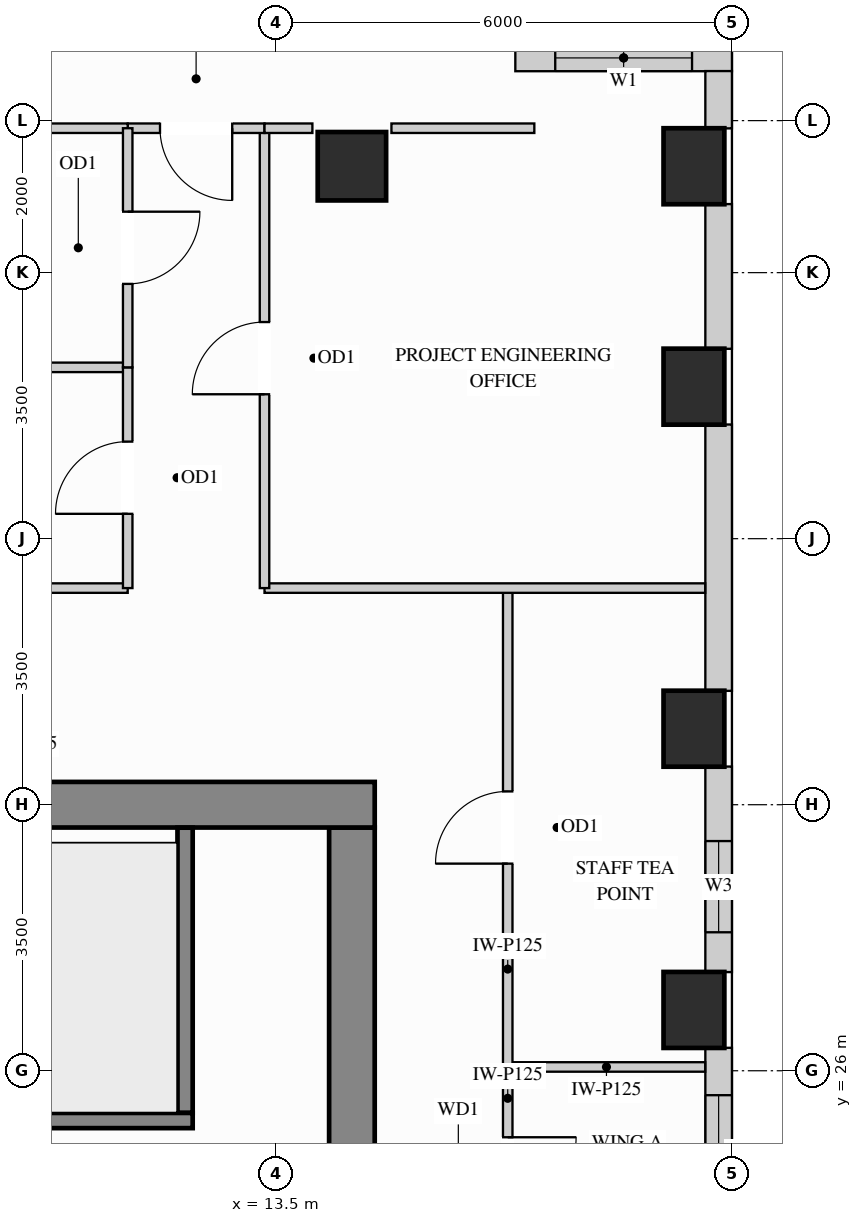
"""IFC4 building model, lengths in metres.
Left out: names, types, materials, properties, quantities, classifications, styles, units other than length and angle.
Written with IfcOpenShell. Run it as: python <this file> out.ifc"""

import sys

from ifc_helpers import new_model, si_unit, direction, frame, frame_2d, origin, origin_2d, place, context, subcontext, project, spatial, rectangle, extrude, source, transform, mapped, element, fill, save


model = new_model("IFC4")
c1 = context("Model", 3, precision=1e-05, world=origin(), true_north=direction((0.0, 1.0)))
c2 = subcontext(c1, "Body", "Model", "MODEL_VIEW")
j1 = project(units=[si_unit("LENGTHUNIT", "METRE"), si_unit("PLANEANGLEUNIT", "RADIAN")], contexts=[c1])
p1 = place(None, origin())
s1 = spatial("IfcSite", under=j1, at=p1, CompositionType="ELEMENT")
p2 = place(p1, origin())
s2 = spatial("IfcBuilding", under=s1, at=p2, CompositionType="ELEMENT")
p3 = place(p2, frame((0.0, 0.0, 146.7)))
s3 = spatial("IfcBuildingStorey", under=s2, at=p3, CompositionType="ELEMENT", Elevation=146.7)
m1 = source(origin(), c2, "Body", "SweptSolid", [
    extrude(rectangle(XDim=0.9, YDim=0.9, at=origin_2d()), origin(), (0.0, 0.0, 1.0), 3.4),
])
p4 = place(p3, frame((14.5, 37.9, 0.0), z_axis=(0.0, 0.0, 1.0), x_axis=(1.0, 0.0, 0.0)))
e1 = element("IfcColumn", 1, at=p4, inside=s3, PredefinedType="COLUMN", context=c2, shape_type="MappedRepresentation", body=[
    mapped(m1, transform((0.0, 0.0, 0.0), x_axis=(1.0, 0.0, 0.0), y_axis=(0.0, 1.0, 0.0), z_axis=(0.0, 0.0, 1.0))),
])
m2 = source(origin(), c2, "Body", "SweptSolid", [
    extrude(rectangle(XDim=0.8, YDim=1.0, at=origin_2d()), origin(), (0.0, 0.0, 1.0), 3.4),
])
for number, where, z_axis, x_axis in (
    (2, (19.0, 26.8, 0.0), (0.0, 0.0, 1.0), (1.0, 0.0, 0.0)),
    (3, (19.0, 30.5, 0.0), (0.0, 0.0, 1.0), (1.0, 0.0, 0.0)),
    (4, (19.0, 35.0, 0.0), (0.0, 0.0, 1.0), (1.0, 0.0, 0.0)),
    (5, (19.0, 37.9, 0.0), (0.0, 0.0, 1.0), (1.0, 0.0, 0.0)),
):
    element("IfcColumn", number, at=place(p3, frame(where, z_axis=z_axis, x_axis=x_axis)), inside=s3, PredefinedType="COLUMN", context=c2, shape_type="MappedRepresentation", body=[
        mapped(m2, transform((0.0, 0.0, 0.0), x_axis=(1.0, 0.0, 0.0), y_axis=(0.0, 1.0, 0.0), z_axis=(0.0, 0.0, 1.0))),
    ])
m3 = source(origin(), c2, "Body", "SweptSolid", [
    extrude(rectangle(XDim=8.32, YDim=0.6, at=frame_2d((4.16, 0.0))), origin(), (0.0, 0.0, 1.0), 3.4),
])
p5 = place(p3, frame((14.5, 20.88, 0.0), z_axis=(0.0, 0.0, 1.0), x_axis=(0.0, 1.0, 0.0)))
e6 = element("IfcWall", 6, at=p5, inside=s3, PredefinedType="SHEAR", context=c2, shape_type="MappedRepresentation", body=[
    mapped(m3, transform((0.0, 0.0, 0.0), x_axis=(1.0, 0.0, 0.0), y_axis=(0.0, 1.0, 0.0), z_axis=(0.0, 0.0, 1.0))),
])
m4 = source(origin(), c2, "Body", "SweptSolid", [
    extrude(rectangle(XDim=10.6, YDim=0.6, at=frame_2d((5.3, 0.0))), origin(), (0.0, 0.0, 1.0), 3.4),
])
p6 = place(p3, frame((4.2, 29.5, 0.0), z_axis=(0.0, 0.0, 1.0), x_axis=(1.0, 0.0, 0.0)))
e7 = element("IfcWall", 7, at=p6, inside=s3, PredefinedType="SHEAR", context=c2, shape_type="MappedRepresentation", body=[
    mapped(m4, transform((0.0, 0.0, 0.0), x_axis=(1.0, 0.0, 0.0), y_axis=(0.0, 1.0, 0.0), z_axis=(0.0, 0.0, 1.0))),
])
p7 = place(p3, frame((19.5, 39.325, 0.0), z_axis=(0.0, 0.0, 1.0), x_axis=(-1.0, 0.0, 0.0)))
e8 = element("IfcWall", 8, at=p7, inside=s3, PredefinedType="SOLIDWALL", context=c2, shape_type="SweptSolid", body=[
    extrude(rectangle(XDim=2.85, YDim=0.35, at=frame_2d((1.425, 0.0))), origin(), (0.0, 0.0, 1.0), 3.385),
])
p8 = place(p7, frame((0.525, 0.0, 0.78)))
e9 = element("IfcOpeningElement", 9, at=p8, cuts=e8, PredefinedType="OPENING", context=c2, shape_type="SweptSolid", body=[
    extrude(rectangle(XDim=1.8, YDim=2.1, at=frame_2d((0.9, 1.05))), frame((0.0, 0.185, 0.0), z_axis=(0.0, -1.0, 0.0), x_axis=(1.0, 0.0, 0.0)), (0.0, 0.0, 1.0), 0.37),
])
p9 = place(p3, frame((19.325, 22.998, 0.0), z_axis=(0.0, 0.0, 1.0), x_axis=(0.0, 1.0, 0.0)))
e10 = element("IfcWall", 10, at=p9, inside=s3, PredefinedType="SOLIDWALL", context=c2, shape_type="SweptSolid", body=[
    extrude(rectangle(XDim=3.304, YDim=0.35, at=frame_2d((1.652, 0.0))), origin(), (0.0, 0.0, 1.0), 2.612),
])
p10 = place(p9, frame((1.18, 0.0, 0.78)))
e11 = element("IfcOpeningElement", 11, at=p10, cuts=e10, PredefinedType="OPENING", context=c2, shape_type="SweptSolid", body=[
    extrude(rectangle(XDim=1.5, YDim=1.652, at=frame_2d((0.75, 0.826))), frame((0.0, 0.185, 0.0), z_axis=(0.0, -1.0, 0.0), x_axis=(1.0, 0.0, 0.0)), (0.0, 0.0, 1.0), 0.37),
])
p11 = place(p3, frame((19.325, 27.298, 0.0), z_axis=(0.0, 0.0, 1.0), x_axis=(0.0, 1.0, 0.0)))
e12 = element("IfcWall", 12, at=p11, inside=s3, PredefinedType="SOLIDWALL", context=c2, shape_type="SweptSolid", body=[
    extrude(rectangle(XDim=2.704, YDim=0.35, at=frame_2d((1.352, 0.0))), origin(), (0.0, 0.0, 1.0), 2.612),
])
p12 = place(p11, frame((0.524, 0.0, 0.78)))
e13 = element("IfcOpeningElement", 13, at=p12, cuts=e12, PredefinedType="OPENING", context=c2, shape_type="SweptSolid", body=[
    extrude(rectangle(XDim=1.2, YDim=1.652, at=frame_2d((0.6, 0.826))), frame((0.0, 0.185, 0.0), z_axis=(0.0, -1.0, 0.0), x_axis=(1.0, 0.0, 0.0)), (0.0, 0.0, 1.0), 0.37),
])
m5 = source(origin(), c2, "Body", "SweptSolid", [
    extrude(rectangle(XDim=3.504, YDim=0.35, at=frame_2d((1.752, 0.0))), origin(), (0.0, 0.0, 1.0), 2.612),
])
p13 = place(p3, frame((19.325, 30.998, 0.0), z_axis=(0.0, 0.0, 1.0), x_axis=(0.0, 1.0, 0.0)))
e14 = element("IfcWall", 14, at=p13, inside=s3, PredefinedType="SOLIDWALL", context=c2, shape_type="MappedRepresentation", body=[
    mapped(m5, transform((0.0, 0.0, 0.0), x_axis=(1.0, 0.0, 0.0), y_axis=(0.0, 1.0, 0.0), z_axis=(0.0, 0.0, 1.0))),
])
m6 = source(origin(), c2, "Body", "SweptSolid", [
    extrude(rectangle(XDim=1.904, YDim=0.35, at=frame_2d((0.952, 0.0))), origin(), (0.0, 0.0, 1.0), 2.612),
])
p14 = place(p3, frame((19.325, 35.498, 0.0), z_axis=(0.0, 0.0, 1.0), x_axis=(0.0, 1.0, 0.0)))
e15 = element("IfcWall", 15, at=p14, inside=s3, PredefinedType="SOLIDWALL", context=c2, shape_type="MappedRepresentation", body=[
    mapped(m6, transform((0.0, 0.0, 0.0), x_axis=(1.0, 0.0, 0.0), y_axis=(0.0, 1.0, 0.0), z_axis=(0.0, 0.0, 1.0))),
])
m7 = source(origin(), c2, "Body", "SweptSolid", [
    extrude(rectangle(XDim=0.754, YDim=0.35, at=frame_2d((0.377, 0.0))), origin(), (0.0, 0.0, 1.0), 3.385),
])
p15 = place(p3, frame((19.325, 38.398, 0.0), z_axis=(0.0, 0.0, 1.0), x_axis=(0.0, 1.0, 0.0)))
e16 = element("IfcWall", 16, at=p15, inside=s3, PredefinedType="SOLIDWALL", context=c2, shape_type="MappedRepresentation", body=[
    mapped(m7, transform((0.0, 0.0, 0.0), x_axis=(1.0, 0.0, 0.0), y_axis=(0.0, 1.0, 0.0), z_axis=(0.0, 0.0, 1.0))),
])
m8 = source(origin(), c2, "Body", "SweptSolid", [
    extrude(rectangle(XDim=2.598, YDim=0.125, at=frame_2d((1.299, 0.0))), origin(), (0.0, 0.0, 1.0), 3.385),
])
p16 = place(p3, frame((16.55, 26.05, 0.0), z_axis=(0.0, 0.0, 1.0), x_axis=(1.0, 0.0, 0.0)))
e17 = element("IfcWall", 17, at=p16, inside=s3, PredefinedType="PARTITIONING", context=c2, shape_type="MappedRepresentation", body=[
    mapped(m8, transform((0.0, 0.0, 0.0), x_axis=(1.0, 0.0, 0.0), y_axis=(0.0, 1.0, 0.0), z_axis=(0.0, 0.0, 1.0))),
])
p17 = place(p3, frame((16.55, 26.05, 0.0), z_axis=(0.0, 0.0, 1.0), x_axis=(0.0, 1.0, 0.0)))
e18 = element("IfcWall", 18, at=p17, inside=s3, PredefinedType="PARTITIONING", context=c2, shape_type="SweptSolid", body=[
    extrude(rectangle(XDim=6.3, YDim=0.125, at=frame_2d((3.15, 0.0))), origin(), (0.0, 0.0, 1.0), 3.385),
])
p18 = place(p17, frame((2.675, 0.0, 0.0)))
e19 = element("IfcOpeningElement", 19, at=p18, cuts=e18, PredefinedType="OPENING", context=c2, shape_type="SweptSolid", body=[
    extrude(rectangle(XDim=0.95, YDim=2.15, at=frame_2d((0.475, 1.075))), frame((0.0, 0.073, 0.0), z_axis=(0.0, -1.0, 0.0), x_axis=(1.0, 0.0, 0.0)), (0.0, 0.0, 1.0), 0.145),
])
p19 = place(p3, frame((16.55, 23.35, 0.0), z_axis=(0.0, 0.0, 1.0), x_axis=(0.0, 1.0, 0.0)))
e20 = element("IfcWall", 20, at=p19, inside=s3, PredefinedType="PARTITIONING", context=c2, shape_type="SweptSolid", body=[
    extrude(rectangle(XDim=2.7, YDim=0.125, at=frame_2d((1.35, 0.0))), origin(), (0.0, 0.0, 1.0), 3.385),
])
p20 = place(p19, frame((0.875, 0.0, 0.0)))
e21 = element("IfcOpeningElement", 21, at=p20, cuts=e20, PredefinedType="OPENING", context=c2, shape_type="SweptSolid", body=[
    extrude(rectangle(XDim=0.9, YDim=2.15, at=frame_2d((0.45, 1.075))), frame((0.0, 0.073, 0.0), z_axis=(0.0, -1.0, 0.0), x_axis=(1.0, 0.0, 0.0)), (0.0, 0.0, 1.0), 0.145),
])
m9 = source(origin(), c2, "Body", "SweptSolid", [
    extrude(rectangle(XDim=5.798, YDim=0.125, at=frame_2d((2.899, 0.0))), origin(), (0.0, 0.0, 1.0), 3.385),
])
p21 = place(p3, frame((13.35, 32.35, 0.0), z_axis=(0.0, 0.0, 1.0), x_axis=(1.0, 0.0, 0.0)))
e22 = element("IfcWall", 22, at=p21, inside=s3, PredefinedType="PARTITIONING", context=c2, shape_type="MappedRepresentation", body=[
    mapped(m9, transform((0.0, 0.0, 0.0), x_axis=(1.0, 0.0, 0.0), y_axis=(0.0, 1.0, 0.0), z_axis=(0.0, 0.0, 1.0))),
])
m10 = source(origin(), c2, "Body", "SweptSolid", [
    extrude(rectangle(XDim=11.198, YDim=0.125, at=frame_2d((5.599, 0.0))), origin(), (0.0, 0.0, 1.0), 3.385),
])
p22 = place(p3, frame((0.352, 32.35, 0.0), z_axis=(0.0, 0.0, 1.0), x_axis=(1.0, 0.0, 0.0)))
e23 = element("IfcWall", 23, at=p22, inside=s3, PredefinedType="PARTITIONING", context=c2, shape_type="MappedRepresentation", body=[
    mapped(m10, transform((0.0, 0.0, 0.0), x_axis=(1.0, 0.0, 0.0), y_axis=(0.0, 1.0, 0.0), z_axis=(0.0, 0.0, 1.0))),
])
m11 = source(origin(), c2, "Body", "SweptSolid", [
    extrude(rectangle(XDim=10.43, YDim=0.125, at=frame_2d((5.215, 0.0))), origin(), (0.0, 0.0, 1.0), 3.385),
])
p23 = place(p3, frame((1.12, 35.254, 0.0), z_axis=(0.0, 0.0, 1.0), x_axis=(1.0, 0.0, 0.0)))
e24 = element("IfcWall", 24, at=p23, inside=s3, PredefinedType="PARTITIONING", context=c2, shape_type="MappedRepresentation", body=[
    mapped(m11, transform((0.0, 0.0, 0.0), x_axis=(1.0, 0.0, 0.0), y_axis=(0.0, 1.0, 0.0), z_axis=(0.0, 0.0, 1.0))),
])
p24 = place(p3, frame((13.35, 32.35, 0.0), z_axis=(0.0, 0.0, 1.0), x_axis=(0.0, 1.0, 0.0)))
e25 = element("IfcWall", 25, at=p24, inside=s3, PredefinedType="PARTITIONING", context=c2, shape_type="SweptSolid", body=[
    extrude(rectangle(XDim=6.05, YDim=0.125, at=frame_2d((3.025, 0.0))), origin(), (0.0, 0.0, 1.0), 3.385),
])
p25 = place(p24, frame((2.55, 0.0, 0.0)))
e26 = element("IfcOpeningElement", 26, at=p25, cuts=e25, PredefinedType="OPENING", context=c2, shape_type="SweptSolid", body=[
    extrude(rectangle(XDim=0.95, YDim=2.15, at=frame_2d((0.475, 1.075))), frame((0.0, 0.073, 0.0), z_axis=(0.0, -1.0, 0.0), x_axis=(1.0, 0.0, 0.0)), (0.0, 0.0, 1.0), 0.145),
])
p26 = place(p3, frame((11.55, 38.4, 0.0), z_axis=(0.0, 0.0, 1.0), x_axis=(1.0, 0.0, 0.0)))
e27 = element("IfcWall", 27, at=p26, inside=s3, PredefinedType="PARTITIONING", context=c2, shape_type="SweptSolid", body=[
    extrude(rectangle(XDim=1.8, YDim=0.125, at=frame_2d((0.9, 0.0))), origin(), (0.0, 0.0, 1.0), 3.385),
])
p27 = place(p26, frame((0.425, 0.0, 0.0)))
e28 = element("IfcOpeningElement", 28, at=p27, cuts=e27, PredefinedType="OPENING", context=c2, shape_type="SweptSolid", body=[
    extrude(rectangle(XDim=0.95, YDim=2.15, at=frame_2d((0.475, 1.075))), frame((0.0, 0.073, 0.0), z_axis=(0.0, -1.0, 0.0), x_axis=(1.0, 0.0, 0.0)), (0.0, 0.0, 1.0), 0.145),
])
m12 = source(origin(), c2, "Body", "SweptSolid", [
    extrude(rectangle(XDim=0.63, YDim=0.125, at=frame_2d((0.315, 0.0))), origin(), (0.0, 0.0, 1.0), 3.385),
])
p28 = place(p3, frame((13.35, 38.4, 0.0), z_axis=(0.0, 0.0, 1.0), x_axis=(1.0, 0.0, 0.0)))
e29 = element("IfcWall", 29, at=p28, inside=s3, PredefinedType="PARTITIONING", context=c2, shape_type="MappedRepresentation", body=[
    mapped(m12, transform((0.0, 0.0, 0.0), x_axis=(1.0, 0.0, 0.0), y_axis=(0.0, 1.0, 0.0), z_axis=(0.0, 0.0, 1.0))),
])
m13 = source(origin(), c2, "Body", "SweptSolid", [
    extrude(rectangle(XDim=1.88, YDim=0.125, at=frame_2d((0.94, 0.0))), origin(), (0.0, 0.0, 1.0), 3.385),
])
p29 = place(p3, frame((15.02, 38.4, 0.0), z_axis=(0.0, 0.0, 1.0), x_axis=(1.0, 0.0, 0.0)))
e30 = element("IfcWall", 30, at=p29, inside=s3, PredefinedType="PARTITIONING", context=c2, shape_type="MappedRepresentation", body=[
    mapped(m13, transform((0.0, 0.0, 0.0), x_axis=(1.0, 0.0, 0.0), y_axis=(0.0, 1.0, 0.0), z_axis=(0.0, 0.0, 1.0))),
])
m14 = source(origin(), c2, "Body", "SweptSolid", [
    extrude(rectangle(XDim=2.03, YDim=0.125, at=frame_2d((1.015, 0.0))), origin(), (0.0, 0.0, 1.0), 3.385),
])
p30 = place(p3, frame((9.52, 38.4, 0.0), z_axis=(0.0, 0.0, 1.0), x_axis=(1.0, 0.0, 0.0)))
e31 = element("IfcWall", 31, at=p30, inside=s3, PredefinedType="PARTITIONING", context=c2, shape_type="MappedRepresentation", body=[
    mapped(m14, transform((0.0, 0.0, 0.0), x_axis=(1.0, 0.0, 0.0), y_axis=(0.0, 1.0, 0.0), z_axis=(0.0, 0.0, 1.0))),
])
p31 = place(p3, frame((11.55, 32.35, 0.0), z_axis=(0.0, 0.0, 1.0), x_axis=(0.0, 1.0, 0.0)))
e32 = element("IfcWall", 32, at=p31, inside=s3, PredefinedType="PARTITIONING", context=c2, shape_type="SweptSolid", body=[
    extrude(rectangle(XDim=2.904, YDim=0.125, at=frame_2d((1.452, 0.0))), origin(), (0.0, 0.0, 1.0), 3.385),
])
p32 = place(p31, frame((0.977, 0.0, 0.0)))
e33 = element("IfcOpeningElement", 33, at=p32, cuts=e32, PredefinedType="OPENING", context=c2, shape_type="SweptSolid", body=[
    extrude(rectangle(XDim=0.95, YDim=2.15, at=frame_2d((0.475, 1.075))), frame((0.0, 0.073, 0.0), z_axis=(0.0, -1.0, 0.0), x_axis=(1.0, 0.0, 0.0)), (0.0, 0.0, 1.0), 0.145),
])
p33 = place(p3, frame((11.55, 35.254, 0.0), z_axis=(0.0, 0.0, 1.0), x_axis=(0.0, 1.0, 0.0)))
e34 = element("IfcWall", 34, at=p33, inside=s3, PredefinedType="PARTITIONING", context=c2, shape_type="SweptSolid", body=[
    extrude(rectangle(XDim=3.146, YDim=0.125, at=frame_2d((1.573, 0.0))), origin(), (0.0, 0.0, 1.0), 3.385),
])
p34 = place(p33, frame((1.098, 0.0, 0.0)))
e35 = element("IfcOpeningElement", 35, at=p34, cuts=e34, PredefinedType="OPENING", context=c2, shape_type="SweptSolid", body=[
    extrude(rectangle(XDim=0.95, YDim=2.15, at=frame_2d((0.475, 1.075))), frame((0.0, 0.073, 0.0), z_axis=(0.0, -1.0, 0.0), x_axis=(1.0, 0.0, 0.0)), (0.0, 0.0, 1.0), 0.145),
])
m15 = source(origin(), c2, "Body", "SweptSolid", [
    extrude(rectangle(XDim=3.753, YDim=0.2, at=frame_2d((1.876, 0.0))), origin(), (0.0, 0.0, 1.0), 3.4),
])
p35 = place(p3, frame((12.305, 25.445, 0.0), z_axis=(0.0, 0.0, 1.0), x_axis=(0.0, 1.0, 0.0)))
e36 = element("IfcWall", 36, at=p35, inside=s3, PredefinedType="SHEAR", context=c2, shape_type="MappedRepresentation", body=[
    mapped(m15, transform((0.0, 0.0, 0.0), x_axis=(1.0, 0.0, 0.0), y_axis=(0.0, 1.0, 0.0), z_axis=(0.0, 0.0, 1.0))),
])
p36 = place(p3, frame((4.802, 25.345, 0.0), z_axis=(0.0, 0.0, 1.0), x_axis=(1.0, 0.0, 0.0)))
e37 = element("IfcWall", 37, at=p36, inside=s3, PredefinedType="SHEAR", context=c2, shape_type="SweptSolid", body=[
    extrude(rectangle(XDim=7.603, YDim=0.2, at=frame_2d((3.802, 0.0))), origin(), (0.0, 0.0, 1.0), 3.4),
])
p37 = place(p36, frame((0.4, 0.0, 0.0)))
e38 = element("IfcOpeningElement", 38, at=p37, cuts=e37, PredefinedType="OPENING", context=c2, shape_type="SweptSolid", body=[
    extrude(rectangle(XDim=1.1, YDim=2.15, at=frame_2d((0.55, 1.075))), frame((0.0, 0.11, 0.0), z_axis=(0.0, -1.0, 0.0), x_axis=(1.0, 0.0, 0.0)), (0.0, 0.0, 1.0), 0.22),
])
m16 = source(origin(), c2, "Body", "SweptSolid", [
    extrude(rectangle(XDim=0.95, YDim=2.15, at=frame_2d((0.475, 1.075))), frame((0.0, 0.025, 0.0), z_axis=(0.0, -1.0, 0.0), x_axis=(1.0, 0.0, 0.0)), (0.0, 0.0, 1.0), 0.05),
])
p38 = place(p18, origin())
e39 = element("IfcDoor", 39, at=p38, inside=s3, OperationType="SINGLE_SWING_LEFT", PredefinedType="DOOR", context=c2, shape_type="MappedRepresentation", body=[
    mapped(m16, transform((0.0, 0.0, 0.0), x_axis=(1.0, 0.0, 0.0), y_axis=(0.0, 1.0, 0.0), z_axis=(0.0, 0.0, 1.0))),
])
fill(e19, e39)
p39 = place(p25, origin())
e40 = element("IfcDoor", 40, at=p39, inside=s3, OperationType="SINGLE_SWING_LEFT", PredefinedType="DOOR", context=c2, shape_type="MappedRepresentation", body=[
    mapped(m16, transform((0.0, 0.0, 0.0), x_axis=(1.0, 0.0, 0.0), y_axis=(0.0, 1.0, 0.0), z_axis=(0.0, 0.0, 1.0))),
])
fill(e26, e40)
p40 = place(p27, origin())
e41 = element("IfcDoor", 41, at=p40, inside=s3, OperationType="SINGLE_SWING_RIGHT", PredefinedType="DOOR", context=c2, shape_type="MappedRepresentation", body=[
    mapped(m16, transform((0.0, 0.0, 0.0), x_axis=(1.0, 0.0, 0.0), y_axis=(0.0, 1.0, 0.0), z_axis=(0.0, 0.0, 1.0))),
])
fill(e28, e41)
p41 = place(p32, origin())
e42 = element("IfcDoor", 42, at=p41, inside=s3, OperationType="SINGLE_SWING_LEFT", PredefinedType="DOOR", context=c2, shape_type="MappedRepresentation", body=[
    mapped(m16, transform((0.0, 0.0, 0.0), x_axis=(1.0, 0.0, 0.0), y_axis=(0.0, 1.0, 0.0), z_axis=(0.0, 0.0, 1.0))),
])
fill(e33, e42)
p42 = place(p34, origin())
e43 = element("IfcDoor", 43, at=p42, inside=s3, OperationType="SINGLE_SWING_RIGHT", PredefinedType="DOOR", context=c2, shape_type="MappedRepresentation", body=[
    mapped(m16, transform((0.0, 0.0, 0.0), x_axis=(1.0, 0.0, 0.0), y_axis=(0.0, 1.0, 0.0), z_axis=(0.0, 0.0, 1.0))),
])
fill(e35, e43)
m17 = source(origin(), c2, "Body", "SweptSolid", [
    extrude(rectangle(XDim=0.9, YDim=2.15, at=frame_2d((0.45, 1.075))), frame((0.0, 0.025, 0.0), z_axis=(0.0, -1.0, 0.0), x_axis=(1.0, 0.0, 0.0)), (0.0, 0.0, 1.0), 0.05),
])
p43 = place(p20, origin())
e44 = element("IfcDoor", 44, at=p43, inside=s3, OperationType="SINGLE_SWING_RIGHT", PredefinedType="DOOR", context=c2, shape_type="MappedRepresentation", body=[
    mapped(m17, transform((0.0, 0.0, 0.0), x_axis=(1.0, 0.0, 0.0), y_axis=(0.0, 1.0, 0.0), z_axis=(0.0, 0.0, 1.0))),
])
fill(e21, e44)
m18 = source(origin(), c2, "Body", "SweptSolid", [
    extrude(rectangle(XDim=1.8, YDim=2.1, at=frame_2d((0.9, 1.05))), frame((0.0, 0.03, 0.0), z_axis=(0.0, -1.0, 0.0), x_axis=(1.0, 0.0, 0.0)), (0.0, 0.0, 1.0), 0.06),
])
p44 = place(p8, origin())
e45 = element("IfcWindow", 45, at=p44, inside=s3, PartitioningType="SINGLE_PANEL", PredefinedType="WINDOW", context=c2, shape_type="MappedRepresentation", body=[
    mapped(m18, transform((0.0, 0.0, 0.0), x_axis=(1.0, 0.0, 0.0), y_axis=(0.0, 1.0, 0.0), z_axis=(0.0, 0.0, 1.0))),
])
fill(e9, e45)
m19 = source(origin(), c2, "Body", "SweptSolid", [
    extrude(rectangle(XDim=1.2, YDim=1.652, at=frame_2d((0.6, 0.826))), frame((0.0, 0.03, 0.0), z_axis=(0.0, -1.0, 0.0), x_axis=(1.0, 0.0, 0.0)), (0.0, 0.0, 1.0), 0.06),
])
p45 = place(p12, origin())
e46 = element("IfcWindow", 46, at=p45, inside=s3, PartitioningType="SINGLE_PANEL", PredefinedType="WINDOW", context=c2, shape_type="MappedRepresentation", body=[
    mapped(m19, transform((0.0, 0.0, 0.0), x_axis=(1.0, 0.0, 0.0), y_axis=(0.0, 1.0, 0.0), z_axis=(0.0, 0.0, 1.0))),
])
fill(e13, e46)
m20 = source(origin(), c2, "Body", "SweptSolid", [
    extrude(rectangle(XDim=1.5, YDim=1.652, at=frame_2d((0.75, 0.826))), frame((0.0, 0.03, 0.0), z_axis=(0.0, -1.0, 0.0), x_axis=(1.0, 0.0, 0.0)), (0.0, 0.0, 1.0), 0.06),
])
p46 = place(p10, origin())
e47 = element("IfcWindow", 47, at=p46, inside=s3, PartitioningType="SINGLE_PANEL", PredefinedType="WINDOW", context=c2, shape_type="MappedRepresentation", body=[
    mapped(m20, transform((0.0, 0.0, 0.0), x_axis=(1.0, 0.0, 0.0), y_axis=(0.0, 1.0, 0.0), z_axis=(0.0, 0.0, 1.0))),
])
fill(e11, e47)
save(model, sys.argv[1])
